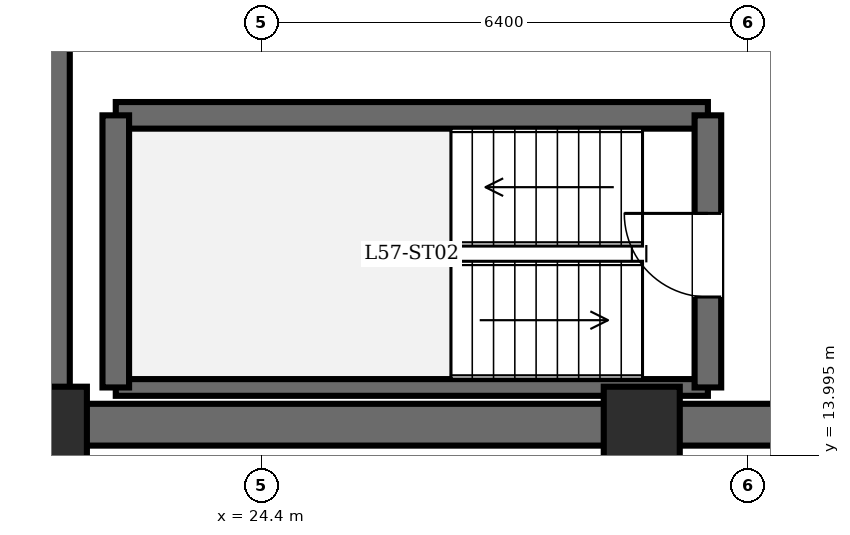
"""IFC4 building model, lengths in metres.
Left out: names, types, materials, properties, quantities, classifications, styles, units other than length and angle.
Written with IfcOpenShell. Run it as: python <this file> out.ifc"""

import sys

from ifc_helpers import new_model, si_unit, direction, frame, frame_2d, origin, origin_2d, place, context, subcontext, project, spatial, rectangle, extrude, element, fill, save


model = new_model("IFC4")
c1 = context("Model", 3, precision=1e-05, world=origin(), true_north=direction((0.0, 1.0)))
c2 = subcontext(c1, "Body", "Model", "MODEL_VIEW")
j1 = project(units=[si_unit("LENGTHUNIT", "METRE"), si_unit("PLANEANGLEUNIT", "RADIAN")], contexts=[c1])
p1 = place(None, origin())
s1 = spatial("IfcSite", under=j1, at=p1, CompositionType="ELEMENT")
p2 = place(p1, origin())
s2 = spatial("IfcBuilding", under=s1, at=p2, CompositionType="ELEMENT")
p3 = place(p2, frame((0.0, 0.0, 219.3)))
s3 = spatial("IfcBuildingStorey", under=s2, at=p3, CompositionType="ELEMENT", Elevation=219.3)
for number, where, z_axis, x_axis in (
    (1, (21.6, 14.4, 0.0), (0.0, 0.0, 1.0), (1.0, 0.0, 0.0)),
    (2, (29.4, 14.4, 0.0), (0.0, 0.0, 1.0), (1.0, 0.0, 0.0)),
):
    element("IfcColumn", number, at=place(p3, frame(where, z_axis=z_axis, x_axis=x_axis)), inside=s3, PredefinedType="COLUMN", context=c2, shape_type="SweptSolid", body=[
        extrude(rectangle(XDim=1.0, YDim=1.0, at=origin_2d()), origin(), (0.0, 0.0, 1.0), 3.6),
    ])
p4 = place(p3, frame((21.6, 14.4, 0.0), z_axis=(0.0, 0.0, 1.0), x_axis=(0.0, 1.0, 0.0)))
e3 = element("IfcWall", 3, at=p4, inside=s3, PredefinedType="SHEAR", context=c2, shape_type="SweptSolid", body=[
    extrude(rectangle(XDim=19.2, YDim=0.55, at=frame_2d((9.6, 0.0))), origin(), (0.0, 0.0, 1.0), 3.4),
])
p5 = place(p3, frame((37.2, 14.4, 0.0), z_axis=(0.0, 0.0, 1.0), x_axis=(-1.0, 0.0, 0.0)))
e4 = element("IfcWall", 4, at=p5, inside=s3, PredefinedType="SHEAR", context=c2, shape_type="SweptSolid", body=[
    extrude(rectangle(XDim=15.6, YDim=0.55, at=frame_2d((7.8, 0.0))), origin(), (0.0, 0.0, 1.0), 3.4),
])
p6 = place(p3, frame((22.48, 18.47, 0.0), z_axis=(0.0, 0.0, 1.0), x_axis=(1.0, 0.0, 0.0)))
e5 = element("IfcWall", 5, at=p6, inside=s3, PredefinedType="SOLIDWALL", context=c2, shape_type="SweptSolid", body=[
    extrude(rectangle(XDim=7.79, YDim=0.35, at=frame_2d((3.895, 0.0))), origin(), (0.0, 0.0, 1.0), 3.4),
])
p7 = place(p3, frame((22.48, 14.89, 0.0), z_axis=(0.0, 0.0, 1.0), x_axis=(1.0, 0.0, 0.0)))
e6 = element("IfcWall", 6, at=p7, inside=s3, PredefinedType="PARTITIONING", context=c2, shape_type="SweptSolid", body=[
    extrude(rectangle(XDim=7.79, YDim=0.22, at=frame_2d((3.895, 0.0))), origin(), (0.0, 0.0, 1.0), 3.4),
])
p8 = place(p3, frame((22.48, 14.89, 0.0), z_axis=(0.0, 0.0, 1.0), x_axis=(0.0, 1.0, 0.0)))
e7 = element("IfcWall", 7, at=p8, inside=s3, PredefinedType="SOLIDWALL", context=c2, shape_type="SweptSolid", body=[
    extrude(rectangle(XDim=3.58, YDim=0.35, at=frame_2d((1.79, 0.0))), origin(), (0.0, 0.0, 1.0), 3.4),
])
p9 = place(p3, frame((30.27, 14.89, 0.0), z_axis=(0.0, 0.0, 1.0), x_axis=(0.0, 1.0, 0.0)))
e8 = element("IfcWall", 8, at=p9, inside=s3, PredefinedType="SOLIDWALL", context=c2, shape_type="SweptSolid", body=[
    extrude(rectangle(XDim=3.58, YDim=0.35, at=frame_2d((1.79, 0.0))), origin(), (0.0, 0.0, 1.0), 3.4),
])
p10 = place(p9, frame((1.19, 0.0, 0.0)))
e9 = element("IfcOpeningElement", 9, at=p10, cuts=e8, PredefinedType="OPENING", context=c2, shape_type="SweptSolid", body=[
    extrude(rectangle(XDim=1.1, YDim=2.15, at=frame_2d((0.55, 1.075))), frame((0.0, 0.185, 0.0), z_axis=(0.0, -1.0, 0.0), x_axis=(1.0, 0.0, 0.0)), (0.0, 0.0, 1.0), 0.37),
])
p11 = place(p10, origin())
e10 = element("IfcDoor", 10, at=p11, inside=s3, OperationType="SINGLE_SWING_RIGHT", PredefinedType="DOOR", context=c2, shape_type="SweptSolid", body=[
    extrude(rectangle(XDim=1.1, YDim=2.15, at=frame_2d((0.55, 1.075))), frame((0.0, 0.025, 0.0), z_axis=(0.0, -1.0, 0.0), x_axis=(1.0, 0.0, 0.0)), (0.0, 0.0, 1.0), 0.05),
])
fill(e9, e10)
save(model, sys.argv[1])
